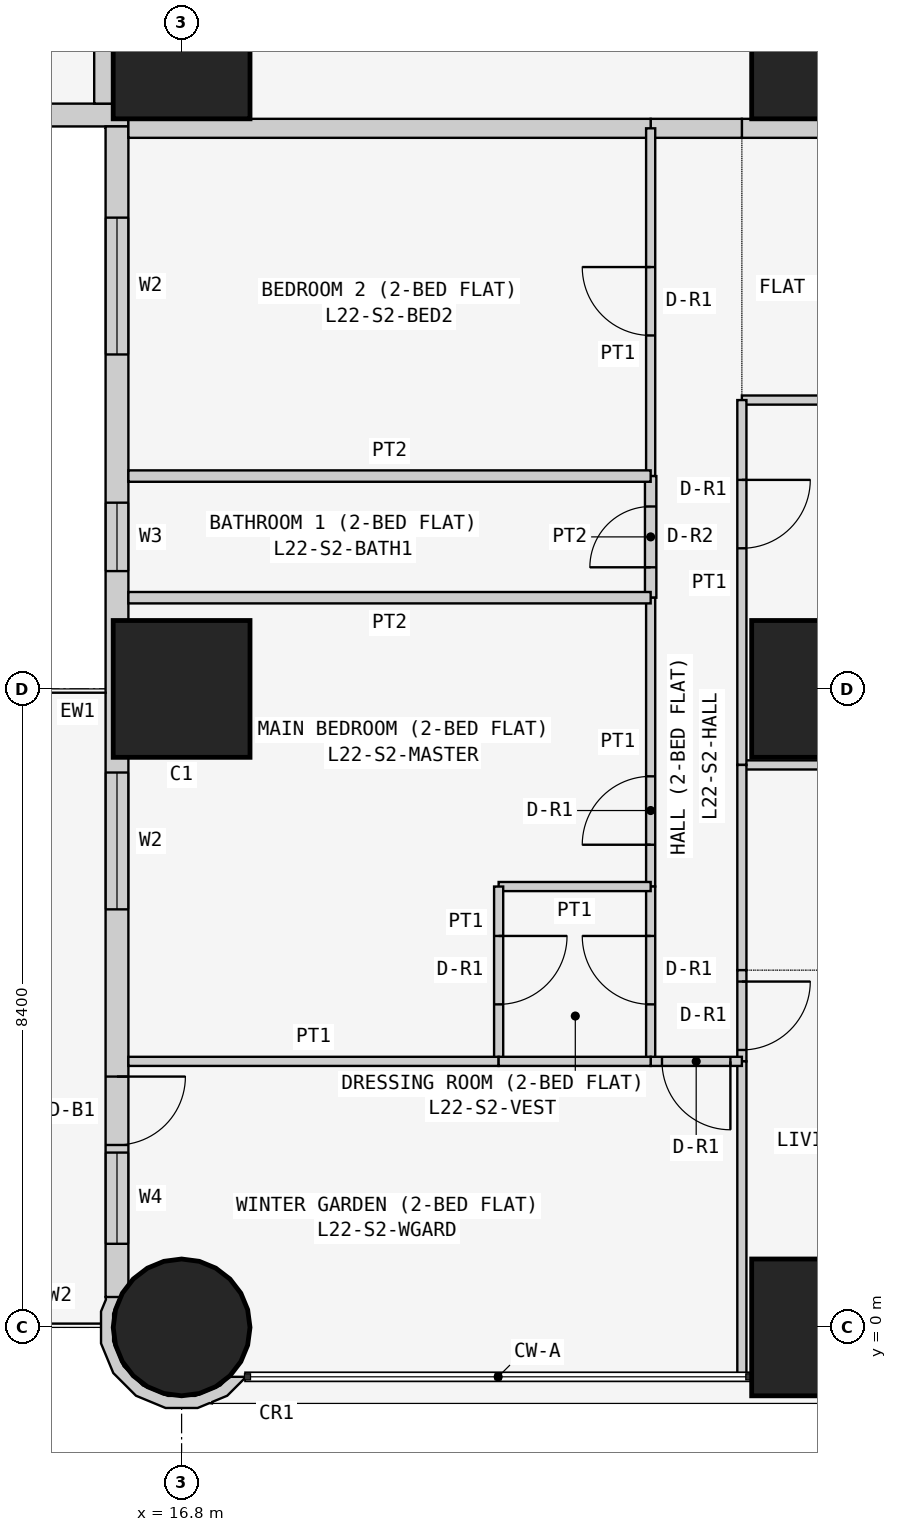
"""IFC4 building model, lengths in metres.
Left out: names, types, materials, properties, quantities, classifications, styles, units other than length and angle.
Written with IfcOpenShell. Run it as: python <this file> out.ifc"""

import sys

from ifc_helpers import new_model, si_unit, direction, frame, frame_2d, origin, origin_2d, place, context, subcontext, project, spatial, polyline, rectangle, circle, outline, extrude, element, fill, save


model = new_model("IFC4")
c1 = context("Model", 3, precision=1e-05, world=origin(), true_north=direction((0.0, 1.0)))
c2 = subcontext(c1, "Body", "Model", "MODEL_VIEW")
j1 = project(units=[si_unit("LENGTHUNIT", "METRE"), si_unit("PLANEANGLEUNIT", "RADIAN")], contexts=[c1])
p1 = place(None, origin())
s1 = spatial("IfcSite", under=j1, at=p1, CompositionType="ELEMENT")
p2 = place(p1, origin())
s2 = spatial("IfcBuilding", under=s1, at=p2, CompositionType="ELEMENT")
p3 = place(p2, frame((0.0, 0.0, 88.5)))
s3 = spatial("IfcBuildingStorey", under=s2, at=p3, CompositionType="ELEMENT", Elevation=88.5)
p4 = place(p3, frame((16.8, 0.0, 0.0), z_axis=(0.0, 0.0, 1.0), x_axis=(1.0, 0.0, 0.0)))
e1 = element("IfcColumn", 1, at=p4, inside=s3, PredefinedType="COLUMN", context=c2, shape_type="SweptSolid", body=[
    extrude(circle(Radius=0.9, at=origin_2d()), origin(), (0.0, 0.0, 1.0), 3.6),
])
for number, where, z_axis, x_axis in (
    (2, (16.8, 8.4, 0.0), (0.0, 0.0, 1.0), (1.0, 0.0, 0.0)),
    (3, (16.8, 16.8, 0.0), (0.0, 0.0, 1.0), (1.0, 0.0, 0.0)),
    (4, (25.2, 0.0, 0.0), (0.0, 0.0, 1.0), (1.0, 0.0, 0.0)),
    (5, (25.2, 8.4, 0.0), (0.0, 0.0, 1.0), (1.0, 0.0, 0.0)),
    (6, (25.2, 16.8, 0.0), (0.0, 0.0, 1.0), (1.0, 0.0, 0.0)),
):
    element("IfcColumn", number, at=place(p3, frame(where, z_axis=z_axis, x_axis=x_axis)), inside=s3, PredefinedType="COLUMN", context=c2, shape_type="SweptSolid", body=[
        extrude(rectangle(XDim=1.8, YDim=1.8, at=origin_2d()), origin(), (0.0, 0.0, 1.0), 3.6),
    ])
p5 = place(p3, frame((0.4, 15.95, 0.0), z_axis=(0.0, 0.0, 1.0), x_axis=(1.0, 0.0, 0.0)))
e7 = element("IfcWall", 7, at=p5, inside=s3, PredefinedType="SOLIDWALL", context=c2, shape_type="SweptSolid", body=[
    extrude(rectangle(XDim=15.7, YDim=0.3, at=frame_2d((7.85, 0.0))), origin(), (0.0, 0.0, 1.0), 3.45),
])
p6 = place(p5, frame((12.4, 0.0, 0.9)))
e8 = element("IfcOpeningElement", 8, at=p6, cuts=e7, PredefinedType="OPENING", context=c2, shape_type="SweptSolid", body=[
    extrude(rectangle(XDim=1.8, YDim=1.5, at=frame_2d((0.9, 0.75))), frame((0.0, 0.16, 0.0), z_axis=(0.0, -1.0, 0.0), x_axis=(1.0, 0.0, 0.0)), (0.0, 0.0, 1.0), 0.32),
])
p7 = place(p5, frame((9.55, 0.0, 1.5)))
e9 = element("IfcOpeningElement", 9, at=p7, cuts=e7, PredefinedType="OPENING", context=c2, shape_type="SweptSolid", body=[
    extrude(rectangle(XDim=0.9, YDim=0.7, at=frame_2d((0.45, 0.35))), frame((0.0, 0.16, 0.0), z_axis=(0.0, -1.0, 0.0), x_axis=(1.0, 0.0, 0.0)), (0.0, 0.0, 1.0), 0.32),
])
p8 = place(p5, frame((5.1, 0.0, 0.9)))
e10 = element("IfcOpeningElement", 10, at=p8, cuts=e7, PredefinedType="OPENING", context=c2, shape_type="SweptSolid", body=[
    extrude(rectangle(XDim=1.8, YDim=1.5, at=frame_2d((0.9, 0.75))), frame((0.0, 0.16, 0.0), z_axis=(0.0, -1.0, 0.0), x_axis=(1.0, 0.0, 0.0)), (0.0, 0.0, 1.0), 0.32),
])
p9 = place(p5, frame((2.0, 0.0, 0.0)))
e11 = element("IfcOpeningElement", 11, at=p9, cuts=e7, PredefinedType="OPENING", context=c2, shape_type="SweptSolid", body=[
    extrude(rectangle(XDim=0.9, YDim=2.4, at=frame_2d((0.45, 1.2))), frame((0.0, 0.16, 0.0), z_axis=(0.0, -1.0, 0.0), x_axis=(1.0, 0.0, 0.0)), (0.0, 0.0, 1.0), 0.32),
])
p10 = place(p5, frame((0.7, 0.0, 0.9)))
e12 = element("IfcOpeningElement", 12, at=p10, cuts=e7, PredefinedType="OPENING", context=c2, shape_type="SweptSolid", body=[
    extrude(rectangle(XDim=1.2, YDim=1.5, at=frame_2d((0.6, 0.75))), frame((0.0, 0.16, 0.0), z_axis=(0.0, -1.0, 0.0), x_axis=(1.0, 0.0, 0.0)), (0.0, 0.0, 1.0), 0.32),
])
p11 = place(p3, frame((15.95, 15.8, 0.0), z_axis=(0.0, 0.0, 1.0), x_axis=(0.0, -1.0, 0.0)))
e13 = element("IfcWall", 13, at=p11, inside=s3, PredefinedType="SOLIDWALL", context=c2, shape_type="SweptSolid", body=[
    extrude(rectangle(XDim=15.4, YDim=0.3, at=frame_2d((7.7, 0.0))), origin(), (0.0, 0.0, 1.0), 3.45),
])
p12 = place(p11, frame((1.2, 0.0, 0.9)))
e14 = element("IfcOpeningElement", 14, at=p12, cuts=e13, PredefinedType="OPENING", context=c2, shape_type="SweptSolid", body=[
    extrude(rectangle(XDim=1.8, YDim=1.5, at=frame_2d((0.9, 0.75))), frame((0.0, 0.16, 0.0), z_axis=(0.0, -1.0, 0.0), x_axis=(1.0, 0.0, 0.0)), (0.0, 0.0, 1.0), 0.32),
])
p13 = place(p11, frame((4.95, 0.0, 1.5)))
e15 = element("IfcOpeningElement", 15, at=p13, cuts=e13, PredefinedType="OPENING", context=c2, shape_type="SweptSolid", body=[
    extrude(rectangle(XDim=0.9, YDim=0.7, at=frame_2d((0.45, 0.35))), frame((0.0, 0.16, 0.0), z_axis=(0.0, -1.0, 0.0), x_axis=(1.0, 0.0, 0.0)), (0.0, 0.0, 1.0), 0.32),
])
p14 = place(p11, frame((8.5, 0.0, 0.9)))
e16 = element("IfcOpeningElement", 16, at=p14, cuts=e13, PredefinedType="OPENING", context=c2, shape_type="SweptSolid", body=[
    extrude(rectangle(XDim=1.8, YDim=1.5, at=frame_2d((0.9, 0.75))), frame((0.0, 0.16, 0.0), z_axis=(0.0, -1.0, 0.0), x_axis=(1.0, 0.0, 0.0)), (0.0, 0.0, 1.0), 0.32),
])
p15 = place(p11, frame((12.5, 0.0, 0.0)))
e17 = element("IfcOpeningElement", 17, at=p15, cuts=e13, PredefinedType="OPENING", context=c2, shape_type="SweptSolid", body=[
    extrude(rectangle(XDim=0.9, YDim=2.4, at=frame_2d((0.45, 1.2))), frame((0.0, 0.16, 0.0), z_axis=(0.0, -1.0, 0.0), x_axis=(1.0, 0.0, 0.0)), (0.0, 0.0, 1.0), 0.32),
])
p16 = place(p11, frame((13.5, 0.0, 0.9)))
e18 = element("IfcOpeningElement", 18, at=p16, cuts=e13, PredefinedType="OPENING", context=c2, shape_type="SweptSolid", body=[
    extrude(rectangle(XDim=1.2, YDim=1.5, at=frame_2d((0.6, 0.75))), frame((0.0, 0.16, 0.0), z_axis=(0.0, -1.0, 0.0), x_axis=(1.0, 0.0, 0.0)), (0.0, 0.0, 1.0), 0.32),
])
p17 = place(p3, frame((15.89, 0.364, 0.0), z_axis=(0.0, 0.0, 1.0), x_axis=(-0.377204953059, -0.926129809145, 0.0)))
e19 = element("IfcWall", 19, at=p17, inside=s3, PredefinedType="SOLIDWALL", context=c2, shape_type="SweptSolid", body=[
    extrude(outline(polyline([(0.36, 1.803), (0.509, 1.741), (0.761, 1.486), (0.896, 1.154), (0.894, 0.795), (0.755, 0.465), (0.5, 0.213), (0.168, 0.078), (-0.1, 0.08), (0.001, -0.097), (0.03, -0.08), (0.199, -0.081), (0.589, 0.078), (0.889, 0.374), (1.053, 0.763), (1.055, 1.185), (0.896, 1.575), (0.778, 1.695), (0.769, 1.728), (0.75, 1.723), (0.6, 1.875), (0.295, 2.004), (0.281, 1.998), (0.36, 1.803)])), origin(), (0.0, 0.0, 1.0), 3.45),
])
p18 = place(p3, frame((29.4, 15.775, 0.0), z_axis=(0.0, 0.0, 1.0), x_axis=(-1.0, 0.0, 0.0)))
e20 = element("IfcWall", 20, at=p18, inside=s3, PredefinedType="PARTITIONING", context=c2, shape_type="SweptSolid", body=[
    extrude(rectangle(XDim=5.229, YDim=0.25, at=frame_2d((2.615, 0.0))), origin(), (0.0, 0.0, 1.0), 3.45),
])
p19 = place(p18, frame((2.1, 0.0, 0.0)))
e21 = element("IfcOpeningElement", 21, at=p19, cuts=e20, PredefinedType="OPENING", context=c2, shape_type="SweptSolid", body=[
    extrude(rectangle(XDim=1.0, YDim=2.1, at=frame_2d((0.5, 1.05))), frame((0.0, 0.135, 0.0), z_axis=(0.0, -1.0, 0.0), x_axis=(1.0, 0.0, 0.0)), (0.0, 0.0, 1.0), 0.27),
])
p20 = place(p3, frame((24.171, 15.775, 0.0), z_axis=(0.0, 0.0, 1.0), x_axis=(-1.0, 0.0, 0.0)))
e22 = element("IfcWall", 22, at=p20, inside=s3, PredefinedType="PARTITIONING", context=c2, shape_type="SweptSolid", body=[
    extrude(rectangle(XDim=1.2, YDim=0.25, at=frame_2d((0.6, 0.0))), origin(), (0.0, 0.0, 1.0), 3.45),
])
p21 = place(p3, frame((22.971, 15.775, 0.0), z_axis=(0.0, 0.0, 1.0), x_axis=(-1.0, 0.0, 0.0)))
e23 = element("IfcWall", 23, at=p21, inside=s3, PredefinedType="PARTITIONING", context=c2, shape_type="SweptSolid", body=[
    extrude(rectangle(XDim=6.871, YDim=0.25, at=frame_2d((3.436, 0.0))), origin(), (0.0, 0.0, 1.0), 3.45),
])
p22 = place(p3, frame((15.775, 16.1, 0.0), z_axis=(0.0, 0.0, 1.0), x_axis=(0.0, 1.0, 0.0)))
e24 = element("IfcWall", 24, at=p22, inside=s3, PredefinedType="PARTITIONING", context=c2, shape_type="SweptSolid", body=[
    extrude(rectangle(XDim=6.471, YDim=0.25, at=frame_2d((3.235, 0.0))), origin(), (0.0, 0.0, 1.0), 3.45),
])
for number, where, z_axis, x_axis in (
    (25, (29.4, 12.2, 0.0), (0.0, 0.0, 1.0), (-1.0, 0.0, 0.0)),
    (26, (29.4, 7.4, 0.0), (0.0, 0.0, 1.0), (-1.0, 0.0, 0.0)),
):
    element("IfcWall", number, at=place(p3, frame(where, z_axis=z_axis, x_axis=x_axis)), inside=s3, PredefinedType="PARTITIONING", context=c2, shape_type="SweptSolid", body=[
        extrude(rectangle(XDim=5.229, YDim=0.12, at=frame_2d((2.615, 0.0))), origin(), (0.0, 0.0, 1.0), 3.45),
    ])
p23 = place(p3, frame((24.171, 7.4, 0.0), z_axis=(0.0, 0.0, 1.0), x_axis=(0.0, 1.0, 0.0)))
e27 = element("IfcWall", 27, at=p23, inside=s3, PredefinedType="PARTITIONING", context=c2, shape_type="SweptSolid", body=[
    extrude(rectangle(XDim=4.8, YDim=0.12, at=frame_2d((2.4, 0.0))), origin(), (0.0, 0.0, 1.0), 3.45),
])
p24 = place(p23, frame((2.85, 0.0, 0.0)))
e28 = element("IfcOpeningElement", 28, at=p24, cuts=e27, PredefinedType="OPENING", context=c2, shape_type="SweptSolid", body=[
    extrude(rectangle(XDim=0.9, YDim=2.1, at=frame_2d((0.45, 1.05))), frame((0.0, 0.07, 0.0), z_axis=(0.0, -1.0, 0.0), x_axis=(1.0, 0.0, 0.0)), (0.0, 0.0, 1.0), 0.14),
])
p25 = place(p3, frame((24.171, 4.7, 0.0), z_axis=(0.0, 0.0, 1.0), x_axis=(0.0, 1.0, 0.0)))
e29 = element("IfcWall", 29, at=p25, inside=s3, PredefinedType="PARTITIONING", context=c2, shape_type="SweptSolid", body=[
    extrude(rectangle(XDim=2.7, YDim=0.12, at=frame_2d((1.35, 0.0))), origin(), (0.0, 0.0, 1.0), 3.45),
])
p26 = place(p3, frame((24.171, 3.5, 0.0), z_axis=(0.0, 0.0, 1.0), x_axis=(0.0, 1.0, 0.0)))
e30 = element("IfcWall", 30, at=p26, inside=s3, PredefinedType="PARTITIONING", context=c2, shape_type="SweptSolid", body=[
    extrude(rectangle(XDim=1.2, YDim=0.12, at=frame_2d((0.6, 0.0))), origin(), (0.0, 0.0, 1.0), 3.45),
])
p27 = place(p26, frame((0.15, 0.0, 0.0)))
e31 = element("IfcOpeningElement", 31, at=p27, cuts=e30, PredefinedType="OPENING", context=c2, shape_type="SweptSolid", body=[
    extrude(rectangle(XDim=0.9, YDim=2.1, at=frame_2d((0.45, 1.05))), frame((0.0, 0.07, 0.0), z_axis=(0.0, -1.0, 0.0), x_axis=(1.0, 0.0, 0.0)), (0.0, 0.0, 1.0), 0.14),
])
p28 = place(p3, frame((24.171, -0.65, 0.0), z_axis=(0.0, 0.0, 1.0), x_axis=(0.0, 1.0, 0.0)))
e32 = element("IfcWall", 32, at=p28, inside=s3, PredefinedType="PARTITIONING", context=c2, shape_type="SweptSolid", body=[
    extrude(rectangle(XDim=4.15, YDim=0.12, at=frame_2d((2.075, 0.0))), origin(), (0.0, 0.0, 1.0), 3.45),
])
p29 = place(p3, frame((22.971, 11.2, 0.0), z_axis=(0.0, 0.0, 1.0), x_axis=(0.0, 1.0, 0.0)))
e33 = element("IfcWall", 33, at=p29, inside=s3, PredefinedType="PARTITIONING", context=c2, shape_type="SweptSolid", body=[
    extrude(rectangle(XDim=4.575, YDim=0.12, at=frame_2d((2.288, 0.0))), origin(), (0.0, 0.0, 1.0), 3.45),
])
p30 = place(p29, frame((1.85, 0.0, 0.0)))
e34 = element("IfcOpeningElement", 34, at=p30, cuts=e33, PredefinedType="OPENING", context=c2, shape_type="SweptSolid", body=[
    extrude(rectangle(XDim=0.9, YDim=2.1, at=frame_2d((0.45, 1.05))), frame((0.0, 0.07, 0.0), z_axis=(0.0, -1.0, 0.0), x_axis=(1.0, 0.0, 0.0)), (0.0, 0.0, 1.0), 0.14),
])
p31 = place(p3, frame((22.971, 9.6, 0.0), z_axis=(0.0, 0.0, 1.0), x_axis=(0.0, 1.0, 0.0)))
e35 = element("IfcWall", 35, at=p31, inside=s3, PredefinedType="PARTITIONING", context=c2, shape_type="SweptSolid", body=[
    extrude(rectangle(XDim=1.6, YDim=0.15, at=frame_2d((0.8, 0.0))), origin(), (0.0, 0.0, 1.0), 3.45),
])
p32 = place(p31, frame((0.4, 0.0, 0.0)))
e36 = element("IfcOpeningElement", 36, at=p32, cuts=e35, PredefinedType="OPENING", context=c2, shape_type="SweptSolid", body=[
    extrude(rectangle(XDim=0.8, YDim=2.1, at=frame_2d((0.4, 1.05))), frame((0.0, 0.085, 0.0), z_axis=(0.0, -1.0, 0.0), x_axis=(1.0, 0.0, 0.0)), (0.0, 0.0, 1.0), 0.17),
])
p33 = place(p3, frame((22.971, 5.8, 0.0), z_axis=(0.0, 0.0, 1.0), x_axis=(0.0, 1.0, 0.0)))
e37 = element("IfcWall", 37, at=p33, inside=s3, PredefinedType="PARTITIONING", context=c2, shape_type="SweptSolid", body=[
    extrude(rectangle(XDim=3.8, YDim=0.12, at=frame_2d((1.9, 0.0))), origin(), (0.0, 0.0, 1.0), 3.45),
])
p34 = place(p33, frame((0.55, 0.0, 0.0)))
e38 = element("IfcOpeningElement", 38, at=p34, cuts=e37, PredefinedType="OPENING", context=c2, shape_type="SweptSolid", body=[
    extrude(rectangle(XDim=0.9, YDim=2.1, at=frame_2d((0.45, 1.05))), frame((0.0, 0.07, 0.0), z_axis=(0.0, -1.0, 0.0), x_axis=(1.0, 0.0, 0.0)), (0.0, 0.0, 1.0), 0.14),
])
p35 = place(p3, frame((22.971, 3.5, 0.0), z_axis=(0.0, 0.0, 1.0), x_axis=(0.0, 1.0, 0.0)))
e39 = element("IfcWall", 39, at=p35, inside=s3, PredefinedType="PARTITIONING", context=c2, shape_type="SweptSolid", body=[
    extrude(rectangle(XDim=2.3, YDim=0.12, at=frame_2d((1.15, 0.0))), origin(), (0.0, 0.0, 1.0), 3.45),
])
p36 = place(p35, frame((0.75, 0.0, 0.0)))
e40 = element("IfcOpeningElement", 40, at=p36, cuts=e39, PredefinedType="OPENING", context=c2, shape_type="SweptSolid", body=[
    extrude(rectangle(XDim=0.9, YDim=2.1, at=frame_2d((0.45, 1.05))), frame((0.0, 0.07, 0.0), z_axis=(0.0, -1.0, 0.0), x_axis=(1.0, 0.0, 0.0)), (0.0, 0.0, 1.0), 0.14),
])
p37 = place(p3, frame((24.171, 3.5, 0.0), z_axis=(0.0, 0.0, 1.0), x_axis=(-1.0, 0.0, 0.0)))
e41 = element("IfcWall", 41, at=p37, inside=s3, PredefinedType="PARTITIONING", context=c2, shape_type="SweptSolid", body=[
    extrude(rectangle(XDim=1.2, YDim=0.12, at=frame_2d((0.6, 0.0))), origin(), (0.0, 0.0, 1.0), 3.45),
])
p38 = place(p37, frame((0.151, 0.0, 0.0)))
e42 = element("IfcOpeningElement", 42, at=p38, cuts=e41, PredefinedType="OPENING", context=c2, shape_type="SweptSolid", body=[
    extrude(rectangle(XDim=0.9, YDim=2.1, at=frame_2d((0.45, 1.05))), frame((0.0, 0.07, 0.0), z_axis=(0.0, -1.0, 0.0), x_axis=(1.0, 0.0, 0.0)), (0.0, 0.0, 1.0), 0.14),
])
for number, where, z_axis, x_axis in (
    (43, (22.971, 11.2, 0.0), (0.0, 0.0, 1.0), (-1.0, 0.0, 0.0)),
    (44, (22.971, 9.6, 0.0), (0.0, 0.0, 1.0), (-1.0, 0.0, 0.0)),
):
    element("IfcWall", number, at=place(p3, frame(where, z_axis=z_axis, x_axis=x_axis)), inside=s3, PredefinedType="PARTITIONING", context=c2, shape_type="SweptSolid", body=[
        extrude(rectangle(XDim=6.871, YDim=0.15, at=frame_2d((3.436, 0.0))), origin(), (0.0, 0.0, 1.0), 3.45),
    ])
p39 = place(p3, frame((22.971, 5.8, 0.0), z_axis=(0.0, 0.0, 1.0), x_axis=(-1.0, 0.0, 0.0)))
e45 = element("IfcWall", 45, at=p39, inside=s3, PredefinedType="PARTITIONING", context=c2, shape_type="SweptSolid", body=[
    extrude(rectangle(XDim=2.0, YDim=0.12, at=frame_2d((1.0, 0.0))), origin(), (0.0, 0.0, 1.0), 3.45),
])
p40 = place(p3, frame((20.971, 5.8, 0.0), z_axis=(0.0, 0.0, 1.0), x_axis=(0.0, -1.0, 0.0)))
e46 = element("IfcWall", 46, at=p40, inside=s3, PredefinedType="PARTITIONING", context=c2, shape_type="SweptSolid", body=[
    extrude(rectangle(XDim=2.3, YDim=0.12, at=frame_2d((1.15, 0.0))), origin(), (0.0, 0.0, 1.0), 2.848),
])
p41 = place(p40, frame((0.65, 0.0, 0.0)))
e47 = element("IfcOpeningElement", 47, at=p41, cuts=e46, PredefinedType="OPENING", context=c2, shape_type="SweptSolid", body=[
    extrude(rectangle(XDim=0.9, YDim=2.1, at=frame_2d((0.45, 1.05))), frame((0.0, 0.07, 0.0), z_axis=(0.0, -1.0, 0.0), x_axis=(1.0, 0.0, 0.0)), (0.0, 0.0, 1.0), 0.14),
])
p42 = place(p3, frame((20.971, 3.5, 0.0), z_axis=(0.0, 0.0, 1.0), x_axis=(-1.0, 0.0, 0.0)))
e48 = element("IfcWall", 48, at=p42, inside=s3, PredefinedType="PARTITIONING", context=c2, shape_type="SweptSolid", body=[
    extrude(rectangle(XDim=4.871, YDim=0.12, at=frame_2d((2.436, 0.0))), origin(), (0.0, 0.0, 1.0), 3.45),
])
p43 = place(p3, frame((22.971, 3.5, 0.0), z_axis=(0.0, 0.0, 1.0), x_axis=(-1.0, 0.0, 0.0)))
e49 = element("IfcWall", 49, at=p43, inside=s3, PredefinedType="PARTITIONING", context=c2, shape_type="SweptSolid", body=[
    extrude(rectangle(XDim=2.0, YDim=0.12, at=frame_2d((1.0, 0.0))), origin(), (0.0, 0.0, 1.0), 3.45),
])
p44 = place(p12, origin())
e50 = element("IfcWindow", 50, at=p44, inside=s3, PartitioningType="SINGLE_PANEL", PredefinedType="WINDOW", context=c2, shape_type="SweptSolid", body=[
    extrude(rectangle(XDim=1.8, YDim=1.5, at=frame_2d((0.9, 0.75))), frame((0.0, 0.03, 0.0), z_axis=(0.0, -1.0, 0.0), x_axis=(1.0, 0.0, 0.0)), (0.0, 0.0, 1.0), 0.06),
])
fill(e14, e50)
p45 = place(p13, origin())
e51 = element("IfcWindow", 51, at=p45, inside=s3, PartitioningType="SINGLE_PANEL", PredefinedType="WINDOW", context=c2, shape_type="SweptSolid", body=[
    extrude(rectangle(XDim=0.9, YDim=0.7, at=frame_2d((0.45, 0.35))), frame((0.0, 0.03, 0.0), z_axis=(0.0, -1.0, 0.0), x_axis=(1.0, 0.0, 0.0)), (0.0, 0.0, 1.0), 0.06),
])
fill(e15, e51)
p46 = place(p14, origin())
e52 = element("IfcWindow", 52, at=p46, inside=s3, PartitioningType="SINGLE_PANEL", PredefinedType="WINDOW", context=c2, shape_type="SweptSolid", body=[
    extrude(rectangle(XDim=1.8, YDim=1.5, at=frame_2d((0.9, 0.75))), frame((0.0, 0.03, 0.0), z_axis=(0.0, -1.0, 0.0), x_axis=(1.0, 0.0, 0.0)), (0.0, 0.0, 1.0), 0.06),
])
fill(e16, e52)
p47 = place(p15, origin())
e53 = element("IfcDoor", 53, at=p47, inside=s3, OperationType="SINGLE_SWING_LEFT", PredefinedType="DOOR", context=c2, shape_type="SweptSolid", body=[
    extrude(rectangle(XDim=0.9, YDim=2.4, at=frame_2d((0.45, 1.2))), frame((0.0, 0.025, 0.0), z_axis=(0.0, -1.0, 0.0), x_axis=(1.0, 0.0, 0.0)), (0.0, 0.0, 1.0), 0.05),
])
fill(e17, e53)
p48 = place(p16, origin())
e54 = element("IfcWindow", 54, at=p48, inside=s3, PartitioningType="SINGLE_PANEL", PredefinedType="WINDOW", context=c2, shape_type="SweptSolid", body=[
    extrude(rectangle(XDim=1.2, YDim=1.5, at=frame_2d((0.6, 0.75))), frame((0.0, 0.03, 0.0), z_axis=(0.0, -1.0, 0.0), x_axis=(1.0, 0.0, 0.0)), (0.0, 0.0, 1.0), 0.06),
])
fill(e18, e54)
p49 = place(p24, frame((0.9, 0.0, 0.0), z_axis=(0.0, 0.0, 1.0), x_axis=(-1.0, 0.0, 0.0)))
e55 = element("IfcDoor", 55, at=p49, inside=s3, OperationType="SINGLE_SWING_LEFT", PredefinedType="DOOR", context=c2, shape_type="SweptSolid", body=[
    extrude(rectangle(XDim=0.9, YDim=2.1, at=frame_2d((0.45, 1.05))), frame((0.0, 0.025, 0.0), z_axis=(0.0, -1.0, 0.0), x_axis=(1.0, 0.0, 0.0)), (0.0, 0.0, 1.0), 0.05),
])
fill(e28, e55)
p50 = place(p27, frame((0.9, 0.0, 0.0), z_axis=(0.0, 0.0, 1.0), x_axis=(-1.0, 0.0, 0.0)))
e56 = element("IfcDoor", 56, at=p50, inside=s3, OperationType="SINGLE_SWING_LEFT", PredefinedType="DOOR", context=c2, shape_type="SweptSolid", body=[
    extrude(rectangle(XDim=0.9, YDim=2.1, at=frame_2d((0.45, 1.05))), frame((0.0, 0.025, 0.0), z_axis=(0.0, -1.0, 0.0), x_axis=(1.0, 0.0, 0.0)), (0.0, 0.0, 1.0), 0.05),
])
fill(e31, e56)
p51 = place(p30, origin())
e57 = element("IfcDoor", 57, at=p51, inside=s3, OperationType="SINGLE_SWING_RIGHT", PredefinedType="DOOR", context=c2, shape_type="SweptSolid", body=[
    extrude(rectangle(XDim=0.9, YDim=2.1, at=frame_2d((0.45, 1.05))), frame((0.0, 0.025, 0.0), z_axis=(0.0, -1.0, 0.0), x_axis=(1.0, 0.0, 0.0)), (0.0, 0.0, 1.0), 0.05),
])
fill(e34, e57)
p52 = place(p32, origin())
e58 = element("IfcDoor", 58, at=p52, inside=s3, OperationType="SINGLE_SWING_LEFT", PredefinedType="DOOR", context=c2, shape_type="SweptSolid", body=[
    extrude(rectangle(XDim=0.8, YDim=2.1, at=frame_2d((0.4, 1.05))), frame((0.0, 0.025, 0.0), z_axis=(0.0, -1.0, 0.0), x_axis=(1.0, 0.0, 0.0)), (0.0, 0.0, 1.0), 0.05),
])
fill(e36, e58)
p53 = place(p34, origin())
e59 = element("IfcDoor", 59, at=p53, inside=s3, OperationType="SINGLE_SWING_LEFT", PredefinedType="DOOR", context=c2, shape_type="SweptSolid", body=[
    extrude(rectangle(XDim=0.9, YDim=2.1, at=frame_2d((0.45, 1.05))), frame((0.0, 0.025, 0.0), z_axis=(0.0, -1.0, 0.0), x_axis=(1.0, 0.0, 0.0)), (0.0, 0.0, 1.0), 0.05),
])
fill(e38, e59)
p54 = place(p36, origin())
e60 = element("IfcDoor", 60, at=p54, inside=s3, OperationType="SINGLE_SWING_RIGHT", PredefinedType="DOOR", context=c2, shape_type="SweptSolid", body=[
    extrude(rectangle(XDim=0.9, YDim=2.1, at=frame_2d((0.45, 1.05))), frame((0.0, 0.025, 0.0), z_axis=(0.0, -1.0, 0.0), x_axis=(1.0, 0.0, 0.0)), (0.0, 0.0, 1.0), 0.05),
])
fill(e40, e60)
p55 = place(p41, origin())
e61 = element("IfcDoor", 61, at=p55, inside=s3, OperationType="SINGLE_SWING_LEFT", PredefinedType="DOOR", context=c2, shape_type="SweptSolid", body=[
    extrude(rectangle(XDim=0.9, YDim=2.1, at=frame_2d((0.45, 1.05))), frame((0.0, 0.025, 0.0), z_axis=(0.0, -1.0, 0.0), x_axis=(1.0, 0.0, 0.0)), (0.0, 0.0, 1.0), 0.05),
])
fill(e47, e61)
p56 = place(p38, origin())
e62 = element("IfcDoor", 62, at=p56, inside=s3, OperationType="SINGLE_SWING_LEFT", PredefinedType="DOOR", context=c2, shape_type="SweptSolid", body=[
    extrude(rectangle(XDim=0.9, YDim=2.1, at=frame_2d((0.45, 1.05))), frame((0.0, 0.025, 0.0), z_axis=(0.0, -1.0, 0.0), x_axis=(1.0, 0.0, 0.0)), (0.0, 0.0, 1.0), 0.05),
])
fill(e42, e62)
save(model, sys.argv[1])
